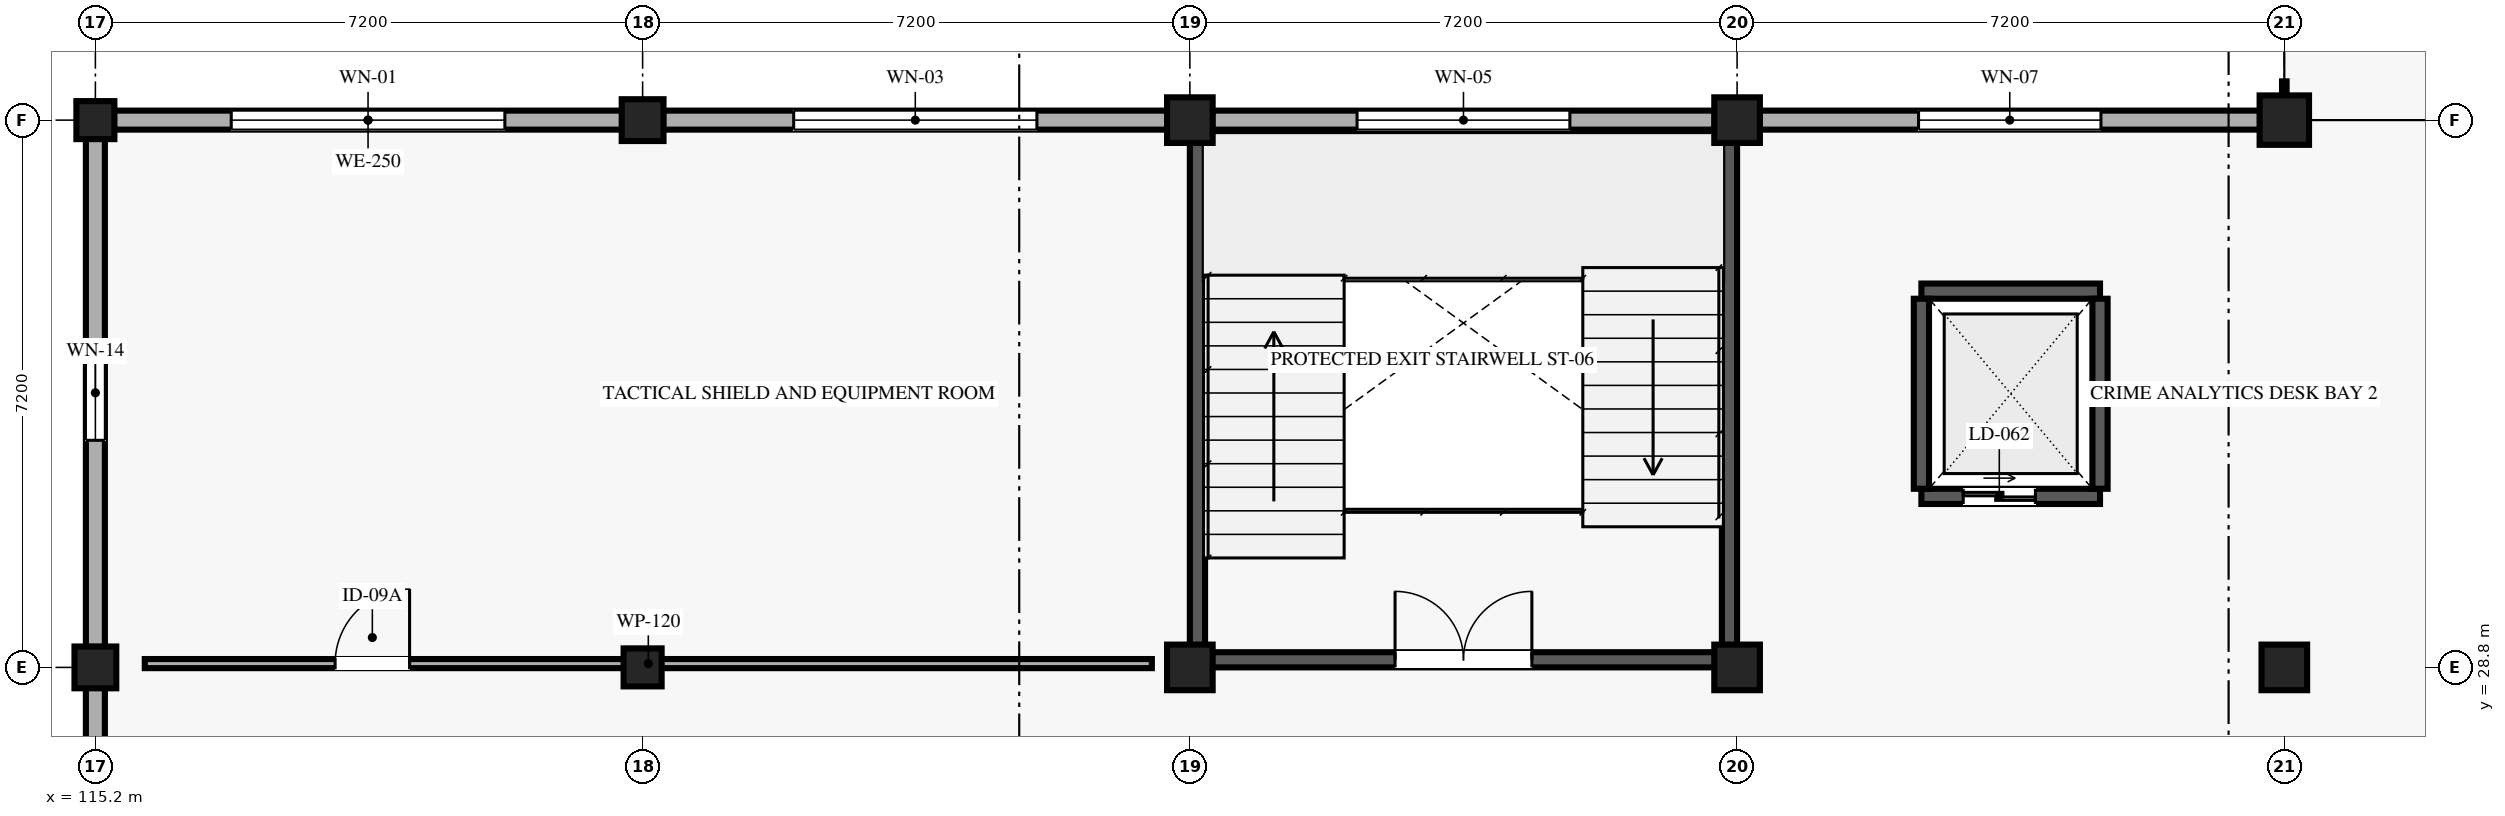
"""IFC4 building model, lengths in metres.
Left out: names, types, materials, properties, quantities, classifications, styles, units other than length and angle.
Written with IfcOpenShell. Run it as: python <this file> out.ifc"""

import sys

from ifc_helpers import new_model, si_unit, direction, frame, frame_2d, origin, origin_2d, place, context, subcontext, project, spatial, rectangle, extrude, element, fill, save


model = new_model("IFC4")
c1 = context("Model", 3, precision=1e-05, world=origin(), true_north=direction((0.0, 1.0)))
c2 = subcontext(c1, "Body", "Model", "MODEL_VIEW")
j1 = project(units=[si_unit("LENGTHUNIT", "METRE"), si_unit("PLANEANGLEUNIT", "RADIAN")], contexts=[c1])
p1 = place(None, origin())
s1 = spatial("IfcSite", under=j1, at=p1, CompositionType="ELEMENT")
p2 = place(p1, origin())
s2 = spatial("IfcBuilding", under=s1, at=p2, CompositionType="ELEMENT")
p3 = place(p2, frame((0.0, 0.0, 17.55)))
s3 = spatial("IfcBuildingStorey", under=s2, at=p3, CompositionType="ELEMENT", Elevation=17.55)
p4 = place(p3, frame((115.2, 28.8, 0.0), z_axis=(0.0, 0.0, 1.0), x_axis=(1.0, 0.0, 0.0)))
e1 = element("IfcColumn", 1, at=p4, inside=s3, PredefinedType="COLUMN", context=c2, shape_type="SweptSolid", body=[
    extrude(rectangle(XDim=0.55, YDim=0.55, at=origin_2d()), origin(), (0.0, 0.0, 1.0), 4.05),
])
for number, where, z_axis, x_axis in (
    (2, (115.2, 36.0, 0.0), (0.0, 0.0, 1.0), (1.0, 0.0, 0.0)),
    (3, (122.4, 28.8, 0.0), (0.0, 0.0, 1.0), (1.0, 0.0, 0.0)),
):
    element("IfcColumn", number, at=place(p3, frame(where, z_axis=z_axis, x_axis=x_axis)), inside=s3, PredefinedType="COLUMN", context=c2, shape_type="SweptSolid", body=[
        extrude(rectangle(XDim=0.5, YDim=0.5, at=origin_2d()), origin(), (0.0, 0.0, 1.0), 4.05),
    ])
p5 = place(p3, frame((122.4, 36.0, 0.0), z_axis=(0.0, 0.0, 1.0), x_axis=(1.0, 0.0, 0.0)))
e4 = element("IfcColumn", 4, at=p5, inside=s3, PredefinedType="COLUMN", context=c2, shape_type="SweptSolid", body=[
    extrude(rectangle(XDim=0.55, YDim=0.55, at=origin_2d()), origin(), (0.0, 0.0, 1.0), 4.05),
])
for number, where, z_axis, x_axis in (
    (5, (129.6, 28.8, 0.0), (0.0, 0.0, 1.0), (1.0, 0.0, 0.0)),
    (6, (129.6, 36.0, 0.0), (0.0, 0.0, 1.0), (1.0, 0.0, 0.0)),
    (7, (136.8, 28.8, 0.0), (0.0, 0.0, 1.0), (1.0, 0.0, 0.0)),
    (8, (136.8, 36.0, 0.0), (0.0, 0.0, 1.0), (1.0, 0.0, 0.0)),
    (9, (144.0, 28.8, 0.0), (0.0, 0.0, 1.0), (1.0, 0.0, 0.0)),
):
    element("IfcColumn", number, at=place(p3, frame(where, z_axis=z_axis, x_axis=x_axis)), inside=s3, PredefinedType="COLUMN", context=c2, shape_type="SweptSolid", body=[
        extrude(rectangle(XDim=0.6, YDim=0.6, at=origin_2d()), origin(), (0.0, 0.0, 1.0), 4.05),
    ])
p6 = place(p3, frame((144.0, 36.0, 0.0), z_axis=(0.0, 0.0, 1.0), x_axis=(1.0, 0.0, 0.0)))
e10 = element("IfcColumn", 10, at=p6, inside=s3, PredefinedType="COLUMN", context=c2, shape_type="SweptSolid", body=[
    extrude(rectangle(XDim=0.65, YDim=0.65, at=origin_2d()), origin(), (0.0, 0.0, 1.0), 4.05),
])
p7 = place(p3, frame((115.445, 36.0, 0.0), z_axis=(0.0, 0.0, 1.0), x_axis=(1.0, 0.0, 0.0)))
e11 = element("IfcWall", 11, at=p7, inside=s3, PredefinedType="SOLIDWALL", context=c2, shape_type="SweptSolid", body=[
    extrude(rectangle(XDim=6.685, YDim=0.25, at=frame_2d((3.342, 0.0))), origin(), (0.0, 0.0, 1.0), 3.295),
])
p8 = place(p7, frame((1.542, 0.0, 0.85)))
e12 = element("IfcOpeningElement", 12, at=p8, cuts=e11, PredefinedType="OPENING", context=c2, shape_type="SweptSolid", body=[
    extrude(rectangle(XDim=3.6, YDim=2.05, at=frame_2d((1.8, 1.025))), frame((0.0, 0.135, 0.0), z_axis=(0.0, -1.0, 0.0), x_axis=(1.0, 0.0, 0.0)), (0.0, 0.0, 1.0), 0.27),
])
p9 = place(p3, frame((122.67, 36.0, 0.0), z_axis=(0.0, 0.0, 1.0), x_axis=(1.0, 0.0, 0.0)))
e13 = element("IfcWall", 13, at=p9, inside=s3, PredefinedType="SOLIDWALL", context=c2, shape_type="SweptSolid", body=[
    extrude(rectangle(XDim=6.635, YDim=0.25, at=frame_2d((3.317, 0.0))), origin(), (0.0, 0.0, 1.0), 3.295),
])
p10 = place(p9, frame((1.718, 0.0, 0.85)))
e14 = element("IfcOpeningElement", 14, at=p10, cuts=e13, PredefinedType="OPENING", context=c2, shape_type="SweptSolid", body=[
    extrude(rectangle(XDim=3.2, YDim=1.95, at=frame_2d((1.6, 0.975))), frame((0.0, 0.135, 0.0), z_axis=(0.0, -1.0, 0.0), x_axis=(1.0, 0.0, 0.0)), (0.0, 0.0, 1.0), 0.27),
])
p11 = place(p3, frame((129.895, 36.0, 0.0), z_axis=(0.0, 0.0, 1.0), x_axis=(1.0, 0.0, 0.0)))
e15 = element("IfcWall", 15, at=p11, inside=s3, PredefinedType="SOLIDWALL", context=c2, shape_type="SweptSolid", body=[
    extrude(rectangle(XDim=6.61, YDim=0.25, at=frame_2d((3.305, 0.0))), origin(), (0.0, 0.0, 1.0), 3.295),
])
p12 = place(p11, frame((1.905, 0.0, 0.85)))
e16 = element("IfcOpeningElement", 16, at=p12, cuts=e15, PredefinedType="OPENING", context=c2, shape_type="SweptSolid", body=[
    extrude(rectangle(XDim=2.8, YDim=1.85, at=frame_2d((1.4, 0.925))), frame((0.0, 0.135, 0.0), z_axis=(0.0, -1.0, 0.0), x_axis=(1.0, 0.0, 0.0)), (0.0, 0.0, 1.0), 0.27),
])
p13 = place(p3, frame((137.095, 36.0, 0.0), z_axis=(0.0, 0.0, 1.0), x_axis=(1.0, 0.0, 0.0)))
e17 = element("IfcWall", 17, at=p13, inside=s3, PredefinedType="SOLIDWALL", context=c2, shape_type="SweptSolid", body=[
    extrude(rectangle(XDim=6.585, YDim=0.25, at=frame_2d((3.292, 0.0))), origin(), (0.0, 0.0, 1.0), 3.295),
])
p14 = place(p13, frame((2.093, 0.0, 0.85)))
e18 = element("IfcOpeningElement", 18, at=p14, cuts=e17, PredefinedType="OPENING", context=c2, shape_type="SweptSolid", body=[
    extrude(rectangle(XDim=2.4, YDim=1.75, at=frame_2d((1.2, 0.875))), frame((0.0, 0.135, 0.0), z_axis=(0.0, -1.0, 0.0), x_axis=(1.0, 0.0, 0.0)), (0.0, 0.0, 1.0), 0.27),
])
p15 = place(p3, frame((115.2, 21.845, 0.0), z_axis=(0.0, 0.0, 1.0), x_axis=(0.0, 1.0, 0.0)))
e19 = element("IfcWall", 19, at=p15, inside=s3, PredefinedType="SOLIDWALL", context=c2, shape_type="SweptSolid", body=[
    extrude(rectangle(XDim=6.685, YDim=0.25, at=frame_2d((3.343, 0.0))), origin(), (0.0, 0.0, 1.0), 3.295),
])
p16 = place(p15, frame((2.643, 0.0, 0.85)))
e20 = element("IfcOpeningElement", 20, at=p16, cuts=e19, PredefinedType="OPENING", context=c2, shape_type="SweptSolid", body=[
    extrude(rectangle(XDim=1.4, YDim=1.6, at=frame_2d((0.7, 0.8))), frame((0.0, 0.135, 0.0), z_axis=(0.0, -1.0, 0.0), x_axis=(1.0, 0.0, 0.0)), (0.0, 0.0, 1.0), 0.27),
])
p17 = place(p3, frame((115.2, 29.07, 0.0), z_axis=(0.0, 0.0, 1.0), x_axis=(0.0, 1.0, 0.0)))
e21 = element("IfcWall", 21, at=p17, inside=s3, PredefinedType="SOLIDWALL", context=c2, shape_type="SweptSolid", body=[
    extrude(rectangle(XDim=6.685, YDim=0.25, at=frame_2d((3.342, 0.0))), origin(), (0.0, 0.0, 1.0), 3.295),
])
p18 = place(p17, frame((2.718, 0.0, 0.85)))
e22 = element("IfcOpeningElement", 22, at=p18, cuts=e21, PredefinedType="OPENING", context=c2, shape_type="SweptSolid", body=[
    extrude(rectangle(XDim=1.25, YDim=1.5, at=frame_2d((0.625, 0.75))), frame((0.0, 0.135, 0.0), z_axis=(0.0, -1.0, 0.0), x_axis=(1.0, 0.0, 0.0)), (0.0, 0.0, 1.0), 0.27),
])
p19 = place(p3, frame((129.8, 28.9, 0.0), z_axis=(0.0, 0.0, 1.0), x_axis=(1.0, 0.0, 0.0)))
e23 = element("IfcWall", 23, at=p19, inside=s3, PredefinedType="SHEAR", context=c2, shape_type="SweptSolid", body=[
    extrude(rectangle(XDim=6.8, YDim=0.2, at=frame_2d((3.4, 0.0))), origin(), (0.0, 0.0, 1.0), 3.83),
])
p20 = place(p19, frame((2.5, 0.0, 0.0)))
e24 = element("IfcOpeningElement", 24, at=p20, cuts=e23, PredefinedType="OPENING", context=c2, shape_type="SweptSolid", body=[
    extrude(rectangle(XDim=1.8, YDim=2.2, at=frame_2d((0.9, 1.1))), frame((0.0, 0.11, 0.0), z_axis=(0.0, -1.0, 0.0), x_axis=(1.0, 0.0, 0.0)), (0.0, 0.0, 1.0), 0.22),
])
for number, where, z_axis, x_axis in (
    (25, (129.7, 29.0, 0.0), (0.0, 0.0, 1.0), (0.0, 1.0, 0.0)),
    (26, (136.7, 29.0, 0.0), (0.0, 0.0, 1.0), (0.0, 1.0, 0.0)),
):
    element("IfcWall", number, at=place(p3, frame(where, z_axis=z_axis, x_axis=x_axis)), inside=s3, PredefinedType="SHEAR", context=c2, shape_type="SweptSolid", body=[
        extrude(rectangle(XDim=6.8, YDim=0.2, at=frame_2d((3.4, 0.0))), origin(), (0.0, 0.0, 1.0), 3.83),
    ])
p21 = place(p3, frame((139.225, 31.05, 0.0), z_axis=(0.0, 0.0, 1.0), x_axis=(1.0, 0.0, 0.0)))
e27 = element("IfcWall", 27, at=p21, inside=s3, PredefinedType="SHEAR", context=c2, shape_type="SweptSolid", body=[
    extrude(rectangle(XDim=2.35, YDim=0.2, at=frame_2d((1.175, 0.0))), origin(), (0.0, 0.0, 1.0), 3.83),
])
p22 = place(p21, frame((0.55, 0.0, 0.0)))
e28 = element("IfcOpeningElement", 28, at=p22, cuts=e27, PredefinedType="OPENING", context=c2, shape_type="SweptSolid", body=[
    extrude(rectangle(XDim=0.95, YDim=2.1, at=frame_2d((0.475, 1.05))), frame((0.0, 0.11, 0.0), z_axis=(0.0, -1.0, 0.0), x_axis=(1.0, 0.0, 0.0)), (0.0, 0.0, 1.0), 0.22),
])
p23 = place(p3, frame((139.225, 33.75, 0.0), z_axis=(0.0, 0.0, 1.0), x_axis=(1.0, 0.0, 0.0)))
e29 = element("IfcWall", 29, at=p23, inside=s3, PredefinedType="SHEAR", context=c2, shape_type="SweptSolid", body=[
    extrude(rectangle(XDim=2.35, YDim=0.2, at=frame_2d((1.175, 0.0))), origin(), (0.0, 0.0, 1.0), 3.83),
])
for number, where, z_axis, x_axis in (
    (30, (139.225, 31.15, 0.0), (0.0, 0.0, 1.0), (0.0, 1.0, 0.0)),
    (31, (141.575, 31.15, 0.0), (0.0, 0.0, 1.0), (0.0, 1.0, 0.0)),
):
    element("IfcWall", number, at=place(p3, frame(where, z_axis=z_axis, x_axis=x_axis)), inside=s3, PredefinedType="SHEAR", context=c2, shape_type="SweptSolid", body=[
        extrude(rectangle(XDim=2.5, YDim=0.2, at=frame_2d((1.25, 0.0))), origin(), (0.0, 0.0, 1.0), 3.83),
    ])
p24 = place(p3, frame((115.85, 28.85, 0.0), z_axis=(0.0, 0.0, 1.0), x_axis=(1.0, 0.0, 0.0)))
e32 = element("IfcWall", 32, at=p24, inside=s3, PredefinedType="PARTITIONING", context=c2, shape_type="SweptSolid", body=[
    extrude(rectangle(XDim=13.25, YDim=0.12, at=frame_2d((6.625, 0.0))), origin(), (0.0, 0.0, 1.0), 3.27),
])
p25 = place(p24, frame((2.504, 0.0, 0.0)))
e33 = element("IfcOpeningElement", 33, at=p25, cuts=e32, PredefinedType="OPENING", context=c2, shape_type="SweptSolid", body=[
    extrude(rectangle(XDim=0.98, YDim=2.1, at=frame_2d((0.49, 1.05))), frame((0.0, 0.07, 0.0), z_axis=(0.0, -1.0, 0.0), x_axis=(1.0, 0.0, 0.0)), (0.0, 0.0, 1.0), 0.14),
])
p26 = place(p8, origin())
e34 = element("IfcWindow", 34, at=p26, inside=s3, PartitioningType="SINGLE_PANEL", PredefinedType="WINDOW", context=c2, shape_type="SweptSolid", body=[
    extrude(rectangle(XDim=3.6, YDim=2.05, at=frame_2d((1.8, 1.025))), frame((0.0, 0.03, 0.0), z_axis=(0.0, -1.0, 0.0), x_axis=(1.0, 0.0, 0.0)), (0.0, 0.0, 1.0), 0.06),
])
fill(e12, e34)
p27 = place(p10, origin())
e35 = element("IfcWindow", 35, at=p27, inside=s3, PartitioningType="SINGLE_PANEL", PredefinedType="WINDOW", context=c2, shape_type="SweptSolid", body=[
    extrude(rectangle(XDim=3.2, YDim=1.95, at=frame_2d((1.6, 0.975))), frame((0.0, 0.03, 0.0), z_axis=(0.0, -1.0, 0.0), x_axis=(1.0, 0.0, 0.0)), (0.0, 0.0, 1.0), 0.06),
])
fill(e14, e35)
p28 = place(p12, origin())
e36 = element("IfcWindow", 36, at=p28, inside=s3, PartitioningType="SINGLE_PANEL", PredefinedType="WINDOW", context=c2, shape_type="SweptSolid", body=[
    extrude(rectangle(XDim=2.8, YDim=1.85, at=frame_2d((1.4, 0.925))), frame((0.0, 0.03, 0.0), z_axis=(0.0, -1.0, 0.0), x_axis=(1.0, 0.0, 0.0)), (0.0, 0.0, 1.0), 0.06),
])
fill(e16, e36)
p29 = place(p14, origin())
e37 = element("IfcWindow", 37, at=p29, inside=s3, PartitioningType="SINGLE_PANEL", PredefinedType="WINDOW", context=c2, shape_type="SweptSolid", body=[
    extrude(rectangle(XDim=2.4, YDim=1.75, at=frame_2d((1.2, 0.875))), frame((0.0, 0.03, 0.0), z_axis=(0.0, -1.0, 0.0), x_axis=(1.0, 0.0, 0.0)), (0.0, 0.0, 1.0), 0.06),
])
fill(e18, e37)
p30 = place(p18, origin())
e38 = element("IfcWindow", 38, at=p30, inside=s3, PartitioningType="SINGLE_PANEL", PredefinedType="WINDOW", context=c2, shape_type="SweptSolid", body=[
    extrude(rectangle(XDim=1.25, YDim=1.5, at=frame_2d((0.625, 0.75))), frame((0.0, 0.03, 0.0), z_axis=(0.0, -1.0, 0.0), x_axis=(1.0, 0.0, 0.0)), (0.0, 0.0, 1.0), 0.06),
])
fill(e22, e38)
p31 = place(p20, origin())
e39 = element("IfcDoor", 39, at=p31, inside=s3, OperationType="DOUBLE_DOOR_SINGLE_SWING", PredefinedType="DOOR", context=c2, shape_type="SweptSolid", body=[
    extrude(rectangle(XDim=1.8, YDim=2.2, at=frame_2d((0.9, 1.1))), frame((0.0, 0.025, 0.0), z_axis=(0.0, -1.0, 0.0), x_axis=(1.0, 0.0, 0.0)), (0.0, 0.0, 1.0), 0.05),
])
fill(e24, e39)
p32 = place(p22, origin())
e40 = element("IfcDoor", 40, at=p32, inside=s3, OperationType="DOUBLE_DOOR_SLIDING", PredefinedType="DOOR", context=c2, shape_type="SweptSolid", body=[
    extrude(rectangle(XDim=0.95, YDim=2.1, at=frame_2d((0.475, 1.05))), frame((0.0, 0.025, 0.0), z_axis=(0.0, -1.0, 0.0), x_axis=(1.0, 0.0, 0.0)), (0.0, 0.0, 1.0), 0.05),
])
fill(e28, e40)
p33 = place(p25, origin())
e41 = element("IfcDoor", 41, at=p33, inside=s3, OperationType="SINGLE_SWING_RIGHT", PredefinedType="DOOR", context=c2, shape_type="SweptSolid", body=[
    extrude(rectangle(XDim=0.98, YDim=2.1, at=frame_2d((0.49, 1.05))), frame((0.0, 0.025, 0.0), z_axis=(0.0, -1.0, 0.0), x_axis=(1.0, 0.0, 0.0)), (0.0, 0.0, 1.0), 0.05),
])
fill(e33, e41)
save(model, sys.argv[1])
